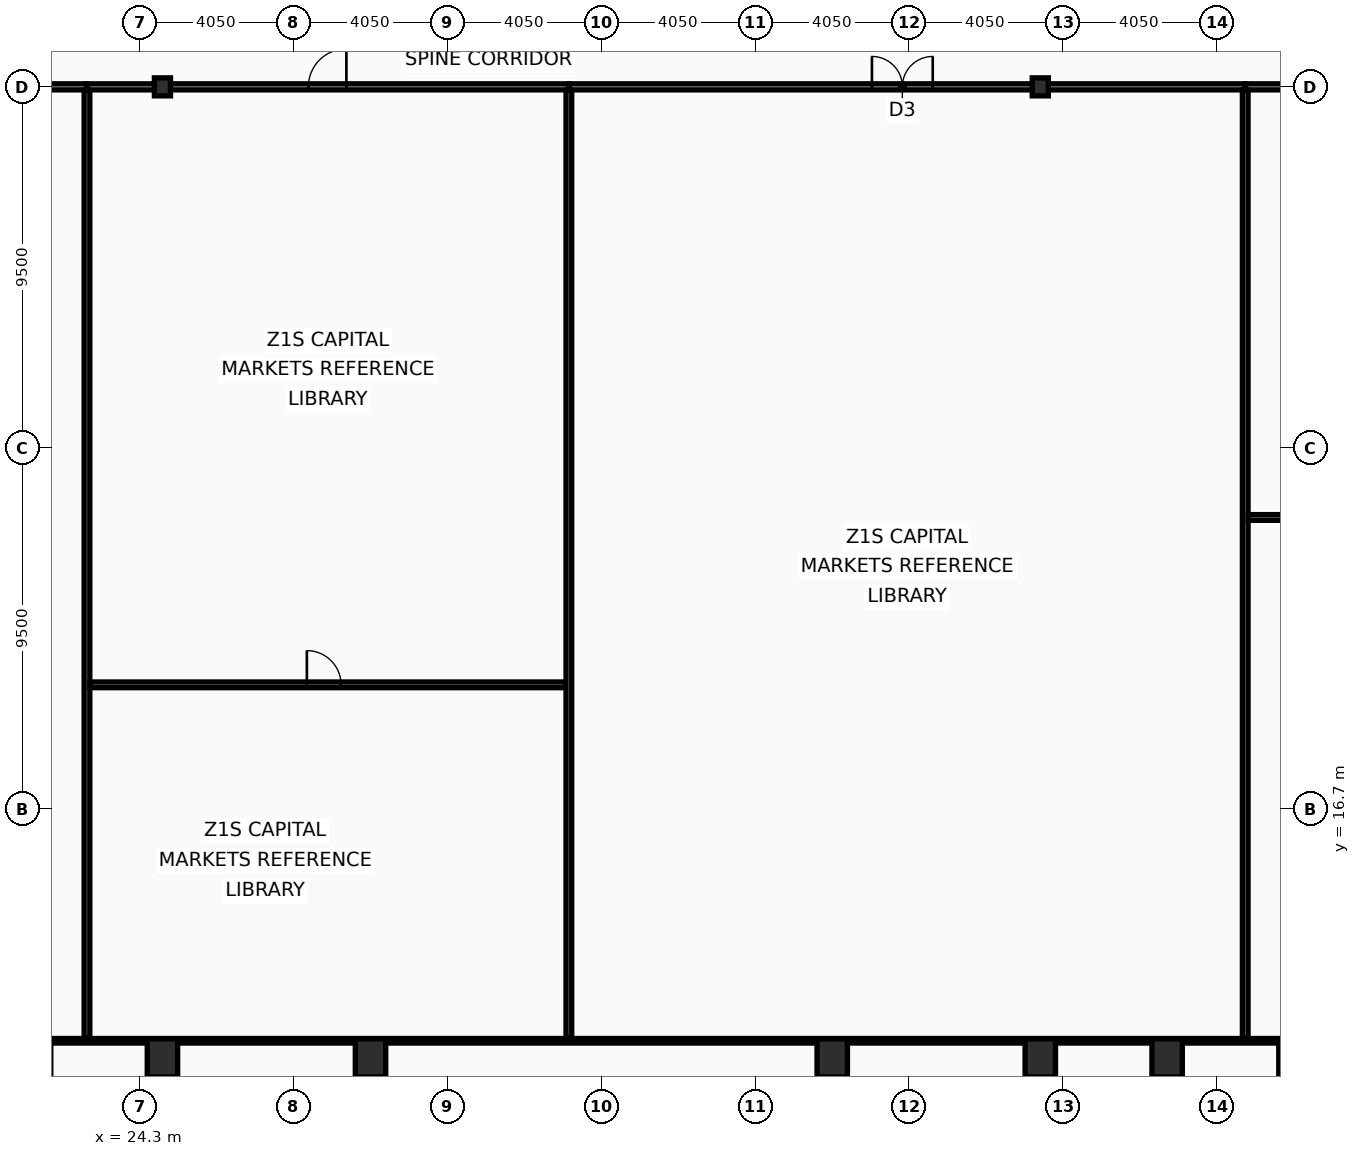
"""IFC4 building model, lengths in metres.
Left out: names, types, materials, properties, quantities, classifications, styles, units other than length and angle.
Written with IfcOpenShell. Run it as: python <this file> out.ifc"""

import sys

from ifc_helpers import new_model, si_unit, direction, frame, frame_2d, origin, origin_2d, place, context, subcontext, project, spatial, rectangle, hollow_rectangle, i_section, extrude, element, fill, save


model = new_model("IFC4")
c1 = context("Model", 3, precision=1e-05, world=origin(), true_north=direction((0.0, 1.0)))
c2 = subcontext(c1, "Body", "Model", "MODEL_VIEW")
j1 = project(units=[si_unit("LENGTHUNIT", "METRE"), si_unit("PLANEANGLEUNIT", "RADIAN")], contexts=[c1])
p1 = place(None, origin())
s1 = spatial("IfcSite", under=j1, at=p1, CompositionType="ELEMENT")
p2 = place(p1, origin())
s2 = spatial("IfcBuilding", under=s1, at=p2, CompositionType="ELEMENT")
p3 = place(p2, frame((0.0, 0.0, 45.8)))
s3 = spatial("IfcBuildingStorey", under=s2, at=p3, CompositionType="ELEMENT", Elevation=45.8)
for number, where, z_axis, x_axis in (
    (1, (24.9, 10.15, 0.0), (0.0, 0.0, 1.0), (1.0, 0.0, 0.0)),
    (2, (30.375, 10.15, 0.0), (0.0, 0.0, 1.0), (1.0, 0.0, 0.0)),
    (3, (42.525, 10.15, 0.0), (0.0, 0.0, 1.0), (1.0, 0.0, 0.0)),
    (4, (48.0, 10.15, 0.0), (0.0, 0.0, 1.0), (1.0, 0.0, 0.0)),
    (5, (51.337, 10.15, 0.0), (0.0, 0.0, 1.0), (1.0, 0.0, 0.0)),
    (6, (54.675, 10.15, 0.0), (0.0, 0.0, 1.0), (1.0, 0.0, 0.0)),
):
    element("IfcColumn", number, at=place(p3, frame(where, z_axis=z_axis, x_axis=x_axis)), inside=s3, PredefinedType="COLUMN", context=c2, shape_type="SweptSolid", body=[
        extrude(hollow_rectangle(XDim=0.8, YDim=1.0, WallThickness=0.055, at=origin_2d()), origin(), (0.0, 0.0, 1.0), 4.0),
    ])
for number, where, z_axis, x_axis in (
    (7, (24.9, 35.7, 0.0), (0.0, 0.0, 1.0), (1.0, 0.0, 0.0)),
    (8, (48.0, 35.7, 0.0), (0.0, 0.0, 1.0), (1.0, 0.0, 0.0)),
):
    element("IfcColumn", number, at=place(p3, frame(where, z_axis=z_axis, x_axis=x_axis)), inside=s3, PredefinedType="COLUMN", context=c2, shape_type="SweptSolid", body=[
        extrude(i_section(OverallWidth=0.424, OverallDepth=0.474, WebThickness=0.048, FlangeThickness=0.077, at=origin_2d()), origin(), (0.0, 0.0, 1.0), 4.0),
    ])
p4 = place(p3, frame((10.4, 35.7, 0.0), z_axis=(0.0, 0.0, 1.0), x_axis=(1.0, 0.0, 0.0)))
e9 = element("IfcWall", 9, at=p4, inside=s3, PredefinedType="PARTITIONING", context=c2, shape_type="SweptSolid", body=[
    extrude(rectangle(XDim=12.514, YDim=0.16, at=frame_2d((6.257, 0.0))), origin(), (0.0, 0.0, 1.0), 3.01),
])
p5 = place(p4, frame((5.756, 0.0, 0.0)))
e10 = element("IfcOpeningElement", 10, at=p5, cuts=e9, PredefinedType="OPENING", context=c2, shape_type="SweptSolid", body=[
    extrude(rectangle(XDim=1.0, YDim=2.05, at=frame_2d((0.5, 1.025))), frame((0.0, 0.09, 0.0), z_axis=(0.0, -1.0, 0.0), x_axis=(1.0, 0.0, 0.0)), (0.0, 0.0, 1.0), 0.18),
])
p6 = place(p3, frame((22.914, 35.7, 0.0), z_axis=(0.0, 0.0, 1.0), x_axis=(1.0, 0.0, 0.0)))
e11 = element("IfcWall", 11, at=p6, inside=s3, PredefinedType="PARTITIONING", context=c2, shape_type="SweptSolid", body=[
    extrude(rectangle(XDim=12.681, YDim=0.16, at=frame_2d((6.34, 0.0))), origin(), (0.0, 0.0, 1.0), 3.01),
])
p7 = place(p6, frame((5.826, 0.0, 0.0)))
e12 = element("IfcOpeningElement", 12, at=p7, cuts=e11, PredefinedType="OPENING", context=c2, shape_type="SweptSolid", body=[
    extrude(rectangle(XDim=1.0, YDim=2.05, at=frame_2d((0.5, 1.025))), frame((0.0, 0.09, 0.0), z_axis=(0.0, -1.0, 0.0), x_axis=(1.0, 0.0, 0.0)), (0.0, 0.0, 1.0), 0.18),
])
p8 = place(p3, frame((22.914, 10.665, 0.0), z_axis=(0.0, 0.0, 1.0), x_axis=(0.0, 1.0, 0.0)))
e13 = element("IfcWall", 13, at=p8, inside=s3, PredefinedType="PARTITIONING", context=c2, shape_type="SweptSolid", body=[
    extrude(rectangle(XDim=24.95, YDim=0.15, at=frame_2d((12.475, 0.0))), origin(), (0.0, 0.0, 1.0), 3.21),
])
p9 = place(p3, frame((22.994, 19.966, 0.0), z_axis=(0.0, 0.0, 1.0), x_axis=(1.0, 0.0, 0.0)))
e14 = element("IfcWall", 14, at=p9, inside=s3, PredefinedType="PARTITIONING", context=c2, shape_type="SweptSolid", body=[
    extrude(rectangle(XDim=12.521, YDim=0.15, at=frame_2d((6.26, 0.0))), origin(), (0.0, 0.0, 1.0), 3.01),
])
p10 = place(p9, frame((5.706, 0.0, 0.0)))
e15 = element("IfcOpeningElement", 15, at=p10, cuts=e14, PredefinedType="OPENING", context=c2, shape_type="SweptSolid", body=[
    extrude(rectangle(XDim=0.9, YDim=2.05, at=frame_2d((0.45, 1.025))), frame((0.0, 0.085, 0.0), z_axis=(0.0, -1.0, 0.0), x_axis=(1.0, 0.0, 0.0)), (0.0, 0.0, 1.0), 0.17),
])
p11 = place(p3, frame((35.595, 35.7, 0.0), z_axis=(0.0, 0.0, 1.0), x_axis=(1.0, 0.0, 0.0)))
e16 = element("IfcWall", 16, at=p11, inside=s3, PredefinedType="PARTITIONING", context=c2, shape_type="SweptSolid", body=[
    extrude(rectangle(XDim=17.797, YDim=0.16, at=frame_2d((8.899, 0.0))), origin(), (0.0, 0.0, 1.0), 3.01),
])
p12 = place(p11, frame((7.975, 0.0, 0.0)))
e17 = element("IfcOpeningElement", 17, at=p12, cuts=e16, PredefinedType="OPENING", context=c2, shape_type="SweptSolid", body=[
    extrude(rectangle(XDim=1.6, YDim=2.15, at=frame_2d((0.8, 1.075))), frame((0.0, 0.09, 0.0), z_axis=(0.0, -1.0, 0.0), x_axis=(1.0, 0.0, 0.0)), (0.0, 0.0, 1.0), 0.18),
])
p13 = place(p3, frame((35.595, 10.665, 0.0), z_axis=(0.0, 0.0, 1.0), x_axis=(0.0, 1.0, 0.0)))
e18 = element("IfcWall", 18, at=p13, inside=s3, PredefinedType="PARTITIONING", context=c2, shape_type="SweptSolid", body=[
    extrude(rectangle(XDim=24.95, YDim=0.15, at=frame_2d((12.475, 0.0))), origin(), (0.0, 0.0, 1.0), 3.21),
])
p14 = place(p3, frame((53.392, 35.7, 0.0), z_axis=(0.0, 0.0, 1.0), x_axis=(1.0, 0.0, 0.0)))
e19 = element("IfcWall", 19, at=p14, inside=s3, PredefinedType="PARTITIONING", context=c2, shape_type="SweptSolid", body=[
    extrude(rectangle(XDim=8.51, YDim=0.16, at=frame_2d((4.255, 0.0))), origin(), (0.0, 0.0, 1.0), 3.01),
])
p15 = place(p14, frame((4.074, 0.0, 0.0)))
e20 = element("IfcOpeningElement", 20, at=p15, cuts=e19, PredefinedType="OPENING", context=c2, shape_type="SweptSolid", body=[
    extrude(rectangle(XDim=1.0, YDim=2.05, at=frame_2d((0.5, 1.025))), frame((0.0, 0.09, 0.0), z_axis=(0.0, -1.0, 0.0), x_axis=(1.0, 0.0, 0.0)), (0.0, 0.0, 1.0), 0.18),
])
p16 = place(p3, frame((53.392, 10.665, 0.0), z_axis=(0.0, 0.0, 1.0), x_axis=(0.0, 1.0, 0.0)))
e21 = element("IfcWall", 21, at=p16, inside=s3, PredefinedType="PARTITIONING", context=c2, shape_type="SweptSolid", body=[
    extrude(rectangle(XDim=24.95, YDim=0.15, at=frame_2d((12.475, 0.0))), origin(), (0.0, 0.0, 1.0), 3.21),
])
p17 = place(p3, frame((53.472, 24.369, 0.0), z_axis=(0.0, 0.0, 1.0), x_axis=(1.0, 0.0, 0.0)))
e22 = element("IfcWall", 22, at=p17, inside=s3, PredefinedType="PARTITIONING", context=c2, shape_type="SweptSolid", body=[
    extrude(rectangle(XDim=8.349, YDim=0.15, at=frame_2d((4.175, 0.0))), origin(), (0.0, 0.0, 1.0), 3.01),
])
p18 = place(p17, frame((3.829, 0.0, 0.0)))
e23 = element("IfcOpeningElement", 23, at=p18, cuts=e22, PredefinedType="OPENING", context=c2, shape_type="SweptSolid", body=[
    extrude(rectangle(XDim=0.9, YDim=2.05, at=frame_2d((0.45, 1.025))), frame((0.0, 0.085, 0.0), z_axis=(0.0, -1.0, 0.0), x_axis=(1.0, 0.0, 0.0)), (0.0, 0.0, 1.0), 0.17),
])
p19 = place(p3, frame((2.095, 10.6, 0.0), z_axis=(0.0, 0.0, 1.0), x_axis=(1.0, 0.0, 0.0)))
e24 = element("IfcWall", 24, at=p19, inside=s3, PredefinedType="PARTITIONING", context=c2, shape_type="SweptSolid", body=[
    extrude(rectangle(XDim=68.71, YDim=0.12, at=frame_2d((34.355, 0.0))), origin(), (0.0, 0.0, 1.0), 3.01),
])
p20 = place(p7, origin())
e25 = element("IfcDoor", 25, at=p20, inside=s3, OperationType="SINGLE_SWING_RIGHT", PredefinedType="DOOR", context=c2, shape_type="SweptSolid", body=[
    extrude(rectangle(XDim=1.0, YDim=2.05, at=frame_2d((0.5, 1.025))), frame((0.0, 0.025, 0.0), z_axis=(0.0, -1.0, 0.0), x_axis=(1.0, 0.0, 0.0)), (0.0, 0.0, 1.0), 0.05),
])
fill(e12, e25)
p21 = place(p10, origin())
e26 = element("IfcDoor", 26, at=p21, inside=s3, OperationType="SINGLE_SWING_LEFT", PredefinedType="DOOR", context=c2, shape_type="SweptSolid", body=[
    extrude(rectangle(XDim=0.9, YDim=2.05, at=frame_2d((0.45, 1.025))), frame((0.0, 0.025, 0.0), z_axis=(0.0, -1.0, 0.0), x_axis=(1.0, 0.0, 0.0)), (0.0, 0.0, 1.0), 0.05),
])
fill(e15, e26)
p22 = place(p12, origin())
e27 = element("IfcDoor", 27, at=p22, inside=s3, OperationType="DOUBLE_DOOR_SINGLE_SWING", PredefinedType="DOOR", context=c2, shape_type="SweptSolid", body=[
    extrude(rectangle(XDim=1.6, YDim=2.15, at=frame_2d((0.8, 1.075))), frame((0.0, 0.025, 0.0), z_axis=(0.0, -1.0, 0.0), x_axis=(1.0, 0.0, 0.0)), (0.0, 0.0, 1.0), 0.05),
])
fill(e17, e27)
save(model, sys.argv[1])
